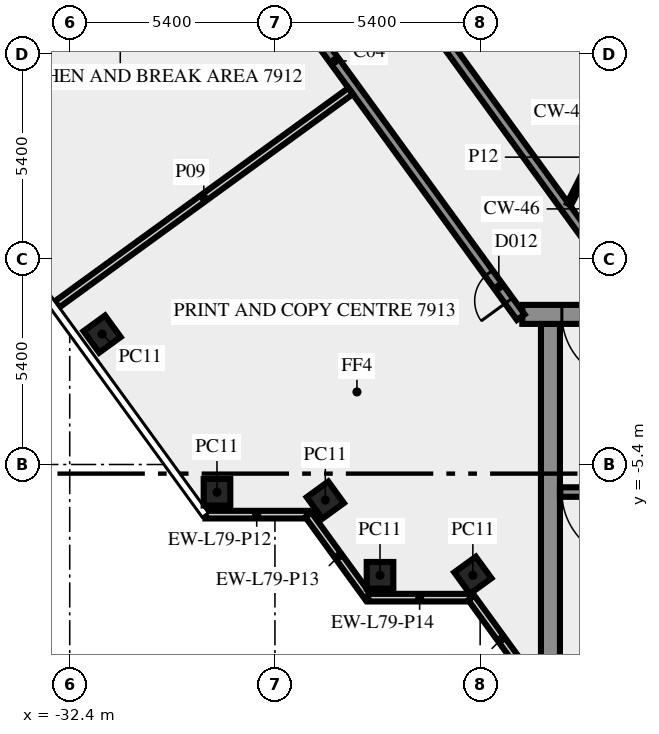
"""IFC4 building model, lengths in metres.
Left out: names, types, materials, properties, quantities, classifications, styles, units other than length and angle.
Written with IfcOpenShell. Run it as: python <this file> out.ifc"""

import sys

from ifc_helpers import new_model, si_unit, direction, frame, frame_2d, origin, origin_2d, place, context, subcontext, project, spatial, rectangle, extrude, element, fill, save


model = new_model("IFC4")
c1 = context("Model", 3, precision=1e-05, world=origin(), true_north=direction((0.0, 1.0)))
c2 = subcontext(c1, "Body", "Model", "MODEL_VIEW")
j1 = project(units=[si_unit("LENGTHUNIT", "METRE"), si_unit("PLANEANGLEUNIT", "RADIAN")], contexts=[c1])
p1 = place(None, origin())
s1 = spatial("IfcSite", under=j1, at=p1, CompositionType="ELEMENT")
p2 = place(p1, origin())
s2 = spatial("IfcBuilding", under=s1, at=p2, CompositionType="ELEMENT")
p3 = place(p2, frame((0.0, 0.0, 339.0)))
s3 = spatial("IfcBuildingStorey", under=s2, at=p3, CompositionType="ELEMENT", Elevation=339.0)
for number, where, z_axis, x_axis in (
    (1, (-31.548, -1.969, 0.0), (0.0, 0.0, 1.0), (0.588, -0.809, 0.0)),
    (2, (-28.525, -6.13, 0.0), (0.0, 0.0, 1.0), (1.0, 0.0, 0.0)),
    (3, (-25.674, -6.337, 0.0), (0.0, 0.0, 1.0), (0.588, -0.809, 0.0)),
    (4, (-24.235, -8.315, 0.0), (0.0, 0.0, 1.0), (1.0, 0.0, 0.0)),
    (5, (-21.792, -8.315, 0.0), (0.0, 0.0, 1.0), (0.588, -0.809, 0.0)),
):
    element("IfcColumn", number, at=place(p3, frame(where, z_axis=z_axis, x_axis=x_axis)), inside=s3, PredefinedType="COLUMN", context=c2, shape_type="SweptSolid", body=[
        extrude(rectangle(XDim=0.7, YDim=0.7, at=origin_2d()), origin(), (0.0, 0.0, 1.0), 3.65),
    ])
p4 = place(p3, frame((-28.83, -6.719, 0.0), z_axis=(0.0, 0.0, 1.0), x_axis=(1.0, 0.0, 0.0)))
e6 = element("IfcWall", 6, at=p4, inside=s3, PredefinedType="SOLIDWALL", context=c2, shape_type="SweptSolid", body=[
    extrude(rectangle(XDim=2.7, YDim=0.2, at=frame_2d((1.35, 0.0))), origin(), (0.0, 0.0, 1.0), 3.65),
])
p5 = place(p3, frame((-26.12, -6.724, 0.0), z_axis=(0.0, 0.0, 1.0), x_axis=(0.587720002413, -0.809064397168, 0.0)))
e7 = element("IfcWall", 7, at=p5, inside=s3, PredefinedType="SOLIDWALL", context=c2, shape_type="SweptSolid", body=[
    extrude(rectangle(XDim=2.7, YDim=0.2, at=frame_2d((1.35, 0.0))), origin(), (0.0, 0.0, 1.0), 3.65),
])
p6 = place(p3, frame((-24.543, -8.904, 0.0), z_axis=(0.0, 0.0, 1.0), x_axis=(1.0, 0.0, 0.0)))
e8 = element("IfcWall", 8, at=p6, inside=s3, PredefinedType="SOLIDWALL", context=c2, shape_type="SweptSolid", body=[
    extrude(rectangle(XDim=2.7, YDim=0.2, at=frame_2d((1.35, 0.0))), origin(), (0.0, 0.0, 1.0), 3.65),
])
p7 = place(p3, frame((-21.833, -8.909, 0.0), z_axis=(0.0, 0.0, 1.0), x_axis=(0.587766567315, -0.809030569476, 0.0)))
e9 = element("IfcWall", 9, at=p7, inside=s3, PredefinedType="SOLIDWALL", context=c2, shape_type="SweptSolid", body=[
    extrude(rectangle(XDim=2.688, YDim=0.2, at=frame_2d((1.344, 0.0))), origin(), (0.0, 0.0, 1.0), 3.65),
])
p8 = place(p3, frame((-19.75, -10.5, 0.0), z_axis=(0.0, 0.0, 1.0), x_axis=(0.0, 1.0, 0.0)))
e10 = element("IfcWall", 10, at=p8, inside=s3, PredefinedType="SHEAR", context=c2, shape_type="SweptSolid", body=[
    extrude(rectangle(XDim=8.8, YDim=0.5, at=frame_2d((4.4, 0.0))), origin(), (0.0, 0.0, 1.0), 3.65),
])
p9 = place(p3, frame((-11.45, -6.125, 0.0), z_axis=(0.0, 0.0, 1.0), x_axis=(-1.0, 0.0, 0.0)))
e11 = element("IfcWall", 11, at=p9, inside=s3, PredefinedType="SHEAR", context=c2, shape_type="SweptSolid", body=[
    extrude(rectangle(XDim=8.05, YDim=0.25, at=frame_2d((4.025, 0.0))), origin(), (0.0, 0.0, 1.0), 3.65),
])
p10 = place(p9, frame((6.2, 0.0, 0.0)))
e12 = element("IfcOpeningElement", 12, at=p10, cuts=e11, PredefinedType="OPENING", context=c2, shape_type="SweptSolid", body=[
    extrude(rectangle(XDim=1.8, YDim=2.1, at=frame_2d((0.9, 1.05))), frame((0.0, 0.135, 0.0), z_axis=(0.0, -1.0, 0.0), x_axis=(1.0, 0.0, 0.0)), (0.0, 0.0, 1.0), 0.27),
])
p11 = place(p3, frame((20.49, -1.45, 0.0), z_axis=(0.0, 0.0, 1.0), x_axis=(-1.0, 0.0, 0.0)))
e13 = element("IfcWall", 13, at=p11, inside=s3, PredefinedType="SHEAR", context=c2, shape_type="SweptSolid", body=[
    extrude(rectangle(XDim=40.98, YDim=0.5, at=frame_2d((20.49, 0.0))), origin(), (0.0, 0.0, 1.0), 3.65),
])
p12 = place(p11, frame((38.14, 0.0, 0.0)))
e14 = element("IfcOpeningElement", 14, at=p12, cuts=e13, PredefinedType="OPENING", context=c2, shape_type="SweptSolid", body=[
    extrude(rectangle(XDim=1.8, YDim=2.1, at=frame_2d((0.9, 1.05))), frame((0.0, 0.26, 0.0), z_axis=(0.0, -1.0, 0.0), x_axis=(1.0, 0.0, 0.0)), (0.0, 0.0, 1.0), 0.52),
])
p13 = place(p11, frame((36.728, 0.0, 0.0)))
e15 = element("IfcOpeningElement", 15, at=p13, cuts=e13, PredefinedType="OPENING", context=c2, shape_type="SweptSolid", body=[
    extrude(rectangle(XDim=0.8, YDim=2.1, at=frame_2d((0.4, 1.05))), frame((0.0, 0.26, 0.0), z_axis=(0.0, -1.0, 0.0), x_axis=(1.0, 0.0, 0.0)), (0.0, 0.0, 1.0), 0.52),
])
p14 = place(p11, frame((35.153, 0.0, 0.0)))
e16 = element("IfcOpeningElement", 16, at=p14, cuts=e13, PredefinedType="OPENING", context=c2, shape_type="SweptSolid", body=[
    extrude(rectangle(XDim=0.8, YDim=2.1, at=frame_2d((0.4, 1.05))), frame((0.0, 0.26, 0.0), z_axis=(0.0, -1.0, 0.0), x_axis=(1.0, 0.0, 0.0)), (0.0, 0.0, 1.0), 0.52),
])
p15 = place(p11, frame((32.94, 0.0, 0.0)))
e17 = element("IfcOpeningElement", 17, at=p15, cuts=e13, PredefinedType="OPENING", context=c2, shape_type="SweptSolid", body=[
    extrude(rectangle(XDim=0.9, YDim=2.1, at=frame_2d((0.45, 1.05))), frame((0.0, 0.26, 0.0), z_axis=(0.0, -1.0, 0.0), x_axis=(1.0, 0.0, 0.0)), (0.0, 0.0, 1.0), 0.52),
])
p16 = place(p11, frame((31.015, 0.0, 0.0)))
e18 = element("IfcOpeningElement", 18, at=p16, cuts=e13, PredefinedType="OPENING", context=c2, shape_type="SweptSolid", body=[
    extrude(rectangle(XDim=0.8, YDim=2.1, at=frame_2d((0.4, 1.05))), frame((0.0, 0.26, 0.0), z_axis=(0.0, -1.0, 0.0), x_axis=(1.0, 0.0, 0.0)), (0.0, 0.0, 1.0), 0.52),
])
p17 = place(p11, frame((24.765, 0.0, 0.0)))
e19 = element("IfcOpeningElement", 19, at=p17, cuts=e13, PredefinedType="OPENING", context=c2, shape_type="SweptSolid", body=[
    extrude(rectangle(XDim=0.8, YDim=2.1, at=frame_2d((0.4, 1.05))), frame((0.0, 0.26, 0.0), z_axis=(0.0, -1.0, 0.0), x_axis=(1.0, 0.0, 0.0)), (0.0, 0.0, 1.0), 0.52),
])
p18 = place(p11, frame((19.59, 0.0, 0.0)))
e20 = element("IfcOpeningElement", 20, at=p18, cuts=e13, PredefinedType="OPENING", context=c2, shape_type="SweptSolid", body=[
    extrude(rectangle(XDim=2.0, YDim=2.1, at=frame_2d((1.0, 1.05))), frame((0.0, 0.26, 0.0), z_axis=(0.0, -1.0, 0.0), x_axis=(1.0, 0.0, 0.0)), (0.0, 0.0, 1.0), 0.52),
])
p19 = place(p11, frame((15.103, 0.0, 0.0)))
e21 = element("IfcOpeningElement", 21, at=p19, cuts=e13, PredefinedType="OPENING", context=c2, shape_type="SweptSolid", body=[
    extrude(rectangle(XDim=0.9, YDim=2.1, at=frame_2d((0.45, 1.05))), frame((0.0, 0.26, 0.0), z_axis=(0.0, -1.0, 0.0), x_axis=(1.0, 0.0, 0.0)), (0.0, 0.0, 1.0), 0.52),
])
p20 = place(p11, frame((13.04, 0.0, 0.0)))
e22 = element("IfcOpeningElement", 22, at=p20, cuts=e13, PredefinedType="OPENING", context=c2, shape_type="SweptSolid", body=[
    extrude(rectangle(XDim=0.9, YDim=2.1, at=frame_2d((0.45, 1.05))), frame((0.0, 0.26, 0.0), z_axis=(0.0, -1.0, 0.0), x_axis=(1.0, 0.0, 0.0)), (0.0, 0.0, 1.0), 0.52),
])
p21 = place(p11, frame((10.177, 0.0, 0.0)))
e23 = element("IfcOpeningElement", 23, at=p21, cuts=e13, PredefinedType="OPENING", context=c2, shape_type="SweptSolid", body=[
    extrude(rectangle(XDim=0.9, YDim=2.1, at=frame_2d((0.45, 1.05))), frame((0.0, 0.26, 0.0), z_axis=(0.0, -1.0, 0.0), x_axis=(1.0, 0.0, 0.0)), (0.0, 0.0, 1.0), 0.52),
])
p22 = place(p11, frame((7.14, 0.0, 0.0)))
e24 = element("IfcOpeningElement", 24, at=p22, cuts=e13, PredefinedType="OPENING", context=c2, shape_type="SweptSolid", body=[
    extrude(rectangle(XDim=0.9, YDim=2.1, at=frame_2d((0.45, 1.05))), frame((0.0, 0.26, 0.0), z_axis=(0.0, -1.0, 0.0), x_axis=(1.0, 0.0, 0.0)), (0.0, 0.0, 1.0), 0.52),
])
p23 = place(p11, frame((4.19, 0.0, 0.0)))
e25 = element("IfcOpeningElement", 25, at=p23, cuts=e13, PredefinedType="OPENING", context=c2, shape_type="SweptSolid", body=[
    extrude(rectangle(XDim=0.9, YDim=2.1, at=frame_2d((0.45, 1.05))), frame((0.0, 0.26, 0.0), z_axis=(0.0, -1.0, 0.0), x_axis=(1.0, 0.0, 0.0)), (0.0, 0.0, 1.0), 0.52),
])
p24 = place(p11, frame((1.04, 0.0, 0.0)))
e26 = element("IfcOpeningElement", 26, at=p24, cuts=e13, PredefinedType="OPENING", context=c2, shape_type="SweptSolid", body=[
    extrude(rectangle(XDim=1.8, YDim=2.1, at=frame_2d((0.9, 1.05))), frame((0.0, 0.26, 0.0), z_axis=(0.0, -1.0, 0.0), x_axis=(1.0, 0.0, 0.0)), (0.0, 0.0, 1.0), 0.52),
])
p25 = place(p3, frame((-20.531, -1.523, 0.0), z_axis=(0.0, 0.0, 1.0), x_axis=(-0.587785867777, 0.809016547199, 0.0)))
e27 = element("IfcWall", 27, at=p25, inside=s3, PredefinedType="SOLIDWALL", context=c2, shape_type="SweptSolid", body=[
    extrude(rectangle(XDim=16.67, YDim=0.25, at=frame_2d((8.335, 0.0))), origin(), (0.0, 0.0, 1.0), 3.65),
])
p26 = place(p25, frame((0.533, 0.0, 0.0)))
e28 = element("IfcOpeningElement", 28, at=p26, cuts=e27, PredefinedType="OPENING", context=c2, shape_type="SweptSolid", body=[
    extrude(rectangle(XDim=0.9, YDim=2.1, at=frame_2d((0.45, 1.05))), frame((0.0, 0.135, 0.0), z_axis=(0.0, -1.0, 0.0), x_axis=(1.0, 0.0, 0.0)), (0.0, 0.0, 1.0), 0.27),
])
p27 = place(p25, frame((15.296, 0.0, 0.0)))
e29 = element("IfcOpeningElement", 29, at=p27, cuts=e27, PredefinedType="OPENING", context=c2, shape_type="SweptSolid", body=[
    extrude(rectangle(XDim=0.9, YDim=2.1, at=frame_2d((0.45, 1.05))), frame((0.0, 0.135, 0.0), z_axis=(0.0, -1.0, 0.0), x_axis=(1.0, 0.0, 0.0)), (0.0, 0.0, 1.0), 0.27),
])
p28 = place(p3, frame((-28.039, 13.319, 0.0), z_axis=(0.0, 0.0, 1.0), x_axis=(0.587791911753, -0.809012155952, 0.0)))
e30 = element("IfcWall", 30, at=p28, inside=s3, PredefinedType="SOLIDWALL", context=c2, shape_type="SweptSolid", body=[
    extrude(rectangle(XDim=17.853, YDim=0.25, at=frame_2d((8.927, 0.0))), origin(), (0.0, 0.0, 1.0), 3.65),
])
p29 = place(p28, frame((0.225, 0.0, 0.0)))
e31 = element("IfcOpeningElement", 31, at=p29, cuts=e30, PredefinedType="OPENING", context=c2, shape_type="SweptSolid", body=[
    extrude(rectangle(XDim=0.9, YDim=2.1, at=frame_2d((0.45, 1.05))), frame((0.0, 0.135, 0.0), z_axis=(0.0, -1.0, 0.0), x_axis=(1.0, 0.0, 0.0)), (0.0, 0.0, 1.0), 0.27),
])
p30 = place(p3, frame((-25.008, 4.427, 0.0), z_axis=(0.0, 0.0, 1.0), x_axis=(-0.808994684961, -0.587815957341, 0.0)))
e32 = element("IfcWall", 32, at=p30, inside=s3, PredefinedType="SOLIDWALL", context=c2, shape_type="SweptSolid", body=[
    extrude(rectangle(XDim=9.55, YDim=0.2, at=frame_2d((4.775, 0.0))), origin(), (0.0, 0.0, 1.0), 2.95),
])
p31 = place(p3, frame((-19.261, 1.45, 0.0), z_axis=(0.0, 0.0, 1.0), x_axis=(0.453950796792, 0.891026752736, 0.0)))
e33 = element("IfcWall", 33, at=p31, inside=s3, PredefinedType="PARTITIONING", context=c2, shape_type="SweptSolid", body=[
    extrude(rectangle(XDim=2.778, YDim=0.12, at=frame_2d((1.389, 0.0))), origin(), (0.0, 0.0, 1.0), 3.65),
])
p32 = place(p10, origin())
e34 = element("IfcDoor", 34, at=p32, inside=s3, OperationType="DOUBLE_DOOR_SINGLE_SWING", PredefinedType="DOOR", context=c2, shape_type="SweptSolid", body=[
    extrude(rectangle(XDim=1.8, YDim=2.1, at=frame_2d((0.9, 1.05))), frame((0.0, 0.025, 0.0), z_axis=(0.0, -1.0, 0.0), x_axis=(1.0, 0.0, 0.0)), (0.0, 0.0, 1.0), 0.05),
])
fill(e12, e34)
p33 = place(p12, origin())
e35 = element("IfcDoor", 35, at=p33, inside=s3, OperationType="DOUBLE_DOOR_SINGLE_SWING", PredefinedType="DOOR", context=c2, shape_type="SweptSolid", body=[
    extrude(rectangle(XDim=1.8, YDim=2.1, at=frame_2d((0.9, 1.05))), frame((0.0, 0.025, 0.0), z_axis=(0.0, -1.0, 0.0), x_axis=(1.0, 0.0, 0.0)), (0.0, 0.0, 1.0), 0.05),
])
fill(e14, e35)
p34 = place(p26, origin())
e36 = element("IfcDoor", 36, at=p34, inside=s3, OperationType="SINGLE_SWING_LEFT", PredefinedType="DOOR", context=c2, shape_type="SweptSolid", body=[
    extrude(rectangle(XDim=0.9, YDim=2.1, at=frame_2d((0.45, 1.05))), frame((0.0, 0.025, 0.0), z_axis=(0.0, -1.0, 0.0), x_axis=(1.0, 0.0, 0.0)), (0.0, 0.0, 1.0), 0.05),
])
fill(e28, e36)
save(model, sys.argv[1])
